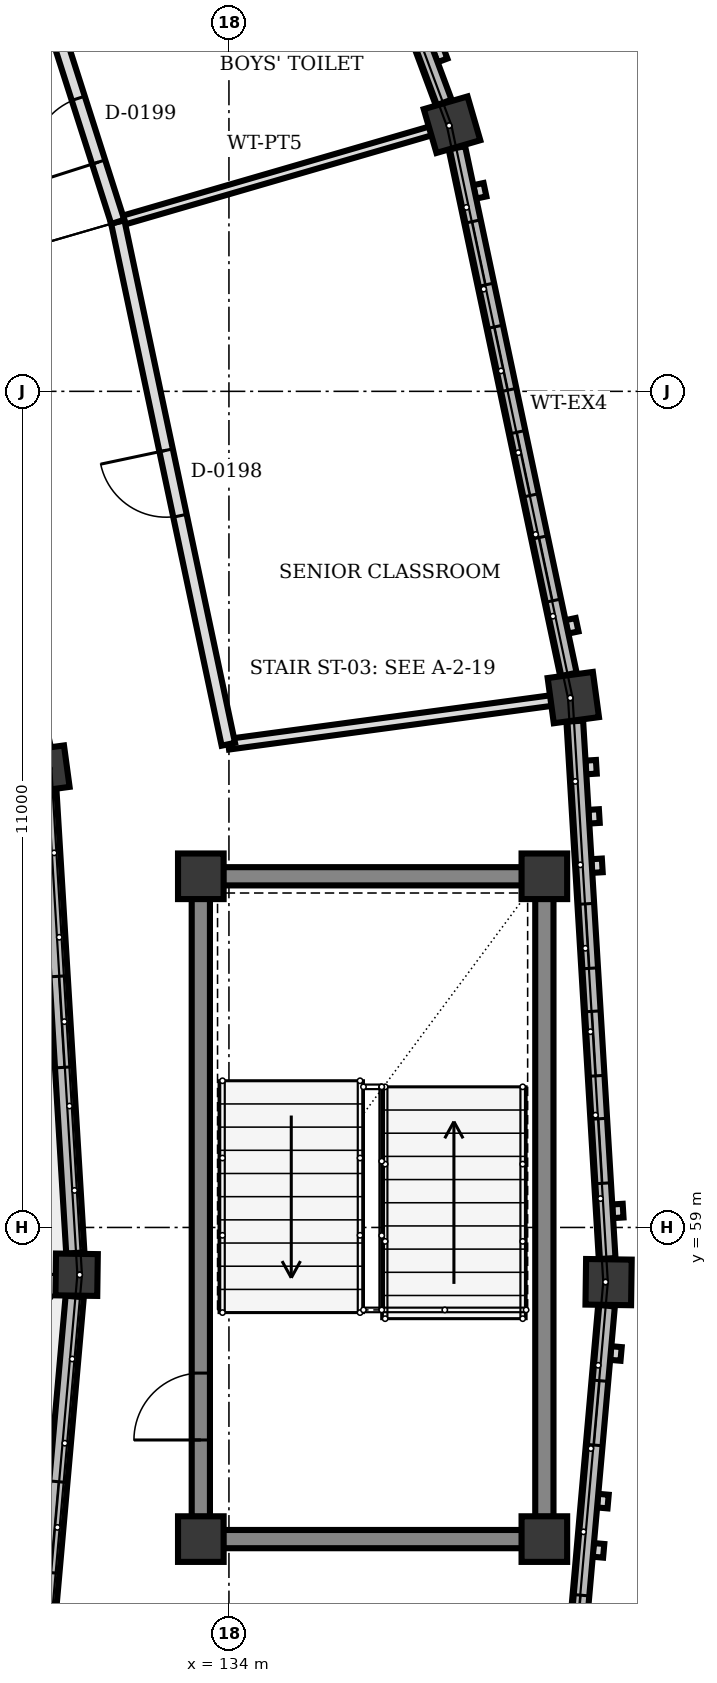
"""IFC4 building model, lengths in metres.
Left out: names, types, materials, properties, quantities, classifications, styles, units other than length and angle.
Written with IfcOpenShell. Run it as: python <this file> out.ifc"""

import sys

from ifc_helpers import new_model, si_unit, direction, frame, frame_2d, origin, origin_2d, place, context, subcontext, project, spatial, rectangle, extrude, element, fill, save


model = new_model("IFC4")
c1 = context("Model", 3, precision=1e-05, world=origin(), true_north=direction((0.0, 1.0)))
c2 = subcontext(c1, "Body", "Model", "MODEL_VIEW")
j1 = project(units=[si_unit("LENGTHUNIT", "METRE"), si_unit("PLANEANGLEUNIT", "RADIAN")], contexts=[c1])
p1 = place(None, origin())
s1 = spatial("IfcSite", under=j1, at=p1, CompositionType="ELEMENT")
p2 = place(p1, origin())
s2 = spatial("IfcBuilding", under=s1, at=p2, CompositionType="ELEMENT")
p3 = place(p2, frame((0.0, 0.0, 8.5)))
s3 = spatial("IfcBuildingStorey", under=s2, at=p3, CompositionType="ELEMENT", Elevation=8.5)
for number, where, z_axis, x_axis in (
    (1, (133.63, 54.9, 0.0), (0.0, 0.0, 1.0), (1.0, 0.0, 0.0)),
    (2, (138.15, 54.9, 0.0), (0.0, 0.0, 1.0), (1.0, 0.0, 0.0)),
    (3, (138.15, 63.62, 0.0), (0.0, 0.0, 1.0), (1.0, 0.0, 0.0)),
    (4, (133.63, 63.62, 0.0), (0.0, 0.0, 1.0), (1.0, 0.0, 0.0)),
):
    element("IfcColumn", number, at=place(p3, frame(where, z_axis=z_axis, x_axis=x_axis)), inside=s3, PredefinedType="COLUMN", context=c2, shape_type="SweptSolid", body=[
        extrude(rectangle(XDim=0.6, YDim=0.6, at=origin_2d()), origin(), (0.0, 0.0, 1.0), 4.0),
    ])
for number, where, z_axis, x_axis in (
    (5, (131.996, 58.378, 0.0), (0.0, 0.0, 1.0), (1.0, -0.014, 0.0)),
    (6, (131.594, 65.032, 0.0), (0.0, 0.0, 1.0), (0.991, 0.134, 0.0)),
):
    element("IfcColumn", number, at=place(p3, frame(where, z_axis=z_axis, x_axis=x_axis)), inside=s3, PredefinedType="COLUMN", context=c2, shape_type="SweptSolid", body=[
        extrude(rectangle(XDim=0.55, YDim=0.55, at=origin_2d()), origin(), (0.0, 0.0, 1.0), 4.0),
    ])
for number, where, z_axis, x_axis in (
    (7, (138.995, 58.281, 0.0), (0.0, 0.0, 1.0), (1.0, -0.014, 0.0)),
    (8, (138.531, 65.971, 0.0), (0.0, 0.0, 1.0), (0.991, 0.134, 0.0)),
    (9, (136.935, 73.508, 0.0), (0.0, 0.0, 1.0), (0.96, 0.279, 0.0)),
):
    element("IfcColumn", number, at=place(p3, frame(where, z_axis=z_axis, x_axis=x_axis)), inside=s3, PredefinedType="COLUMN", context=c2, shape_type="SweptSolid", body=[
        extrude(rectangle(XDim=0.6, YDim=0.6, at=origin_2d()), origin(), (0.0, 0.0, 1.0), 4.0),
    ])
p4 = place(p3, frame((138.968, 57.971, 0.0), z_axis=(0.0, 0.0, 1.0), x_axis=(-0.08798335938, -0.996121944579, 0.0)))
e10 = element("IfcWall", 10, at=p4, inside=s3, PredefinedType="SOLIDWALL", context=c2, shape_type="SweptSolid", body=[
    extrude(rectangle(XDim=7.081, YDim=0.22, at=frame_2d((3.541, 0.0))), origin(), (0.0, 0.0, 1.0), 3.192),
])
p5 = place(p4, frame((0.991, 0.0, 0.85)))
e11 = element("IfcOpeningElement", 11, at=p5, cuts=e10, PredefinedType="OPENING", context=c2, shape_type="SweptSolid", body=[
    extrude(rectangle(XDim=0.85, YDim=1.25, at=frame_2d((0.425, 0.625))), frame((0.0, 0.12, 0.0), z_axis=(0.0, -1.0, 0.0), x_axis=(1.0, 0.0, 0.0)), (0.0, 0.0, 1.0), 0.24),
])
p6 = place(p4, frame((3.824, 0.0, 0.85)))
e12 = element("IfcOpeningElement", 12, at=p6, cuts=e10, PredefinedType="OPENING", context=c2, shape_type="SweptSolid", body=[
    extrude(rectangle(XDim=0.85, YDim=1.25, at=frame_2d((0.425, 0.625))), frame((0.0, 0.12, 0.0), z_axis=(0.0, -1.0, 0.0), x_axis=(1.0, 0.0, 0.0)), (0.0, 0.0, 1.0), 0.24),
])
p7 = place(p4, frame((5.24, 0.0, 0.85)))
e13 = element("IfcOpeningElement", 13, at=p7, cuts=e10, PredefinedType="OPENING", context=c2, shape_type="SweptSolid", body=[
    extrude(rectangle(XDim=0.85, YDim=1.25, at=frame_2d((0.425, 0.625))), frame((0.0, 0.12, 0.0), z_axis=(0.0, -1.0, 0.0), x_axis=(1.0, 0.0, 0.0)), (0.0, 0.0, 1.0), 0.24),
])
p8 = place(p3, frame((131.435, 52.023, 0.0), z_axis=(0.0, 0.0, 1.0), x_axis=(0.087955791154, 0.996124379183, 0.0)))
e14 = element("IfcWall", 14, at=p8, inside=s3, PredefinedType="SOLIDWALL", context=c2, shape_type="SweptSolid", body=[
    extrude(rectangle(XDim=6.093, YDim=0.24, at=frame_2d((3.046, 0.0))), origin(), (0.0, 0.0, 1.0), 3.05),
])
p9 = place(p8, frame((2.446, 0.0, 2.05)))
e15 = element("IfcOpeningElement", 15, at=p9, cuts=e14, PredefinedType="OPENING", context=c2, shape_type="SweptSolid", body=[
    extrude(rectangle(XDim=1.2, YDim=0.85, at=frame_2d((0.6, 0.425))), frame((0.0, 0.13, 0.0), z_axis=(0.0, -1.0, 0.0), x_axis=(1.0, 0.0, 0.0)), (0.0, 0.0, 1.0), 0.26),
])
p10 = place(p3, frame((138.55, 65.661, 0.0), z_axis=(0.0, 0.0, 1.0), x_axis=(0.060150575124, -0.998189314866, 0.0)))
e16 = element("IfcWall", 16, at=p10, inside=s3, PredefinedType="SOLIDWALL", context=c2, shape_type="SweptSolid", body=[
    extrude(rectangle(XDim=7.083, YDim=0.22, at=frame_2d((3.542, 0.0))), origin(), (0.0, 0.0, 1.0), 3.192),
])
p11 = place(p10, frame((2.408, 0.0, 0.85)))
e17 = element("IfcOpeningElement", 17, at=p11, cuts=e16, PredefinedType="OPENING", context=c2, shape_type="SweptSolid", body=[
    extrude(rectangle(XDim=0.85, YDim=1.25, at=frame_2d((0.425, 0.625))), frame((0.0, 0.12, 0.0), z_axis=(0.0, -1.0, 0.0), x_axis=(1.0, 0.0, 0.0)), (0.0, 0.0, 1.0), 0.24),
])
p12 = place(p10, frame((3.825, 0.0, 0.85)))
e18 = element("IfcOpeningElement", 18, at=p12, cuts=e16, PredefinedType="OPENING", context=c2, shape_type="SweptSolid", body=[
    extrude(rectangle(XDim=0.85, YDim=1.25, at=frame_2d((0.425, 0.625))), frame((0.0, 0.12, 0.0), z_axis=(0.0, -1.0, 0.0), x_axis=(1.0, 0.0, 0.0)), (0.0, 0.0, 1.0), 0.24),
])
p13 = place(p10, frame((5.241, 0.0, 0.85)))
e19 = element("IfcOpeningElement", 19, at=p13, cuts=e16, PredefinedType="OPENING", context=c2, shape_type="SweptSolid", body=[
    extrude(rectangle(XDim=0.85, YDim=1.25, at=frame_2d((0.425, 0.625))), frame((0.0, 0.12, 0.0), z_axis=(0.0, -1.0, 0.0), x_axis=(1.0, 0.0, 0.0)), (0.0, 0.0, 1.0), 0.24),
])
p14 = place(p3, frame((131.979, 58.664, 0.0), z_axis=(0.0, 0.0, 1.0), x_axis=(-0.060382554207, 0.998175308825, 0.0)))
e20 = element("IfcWall", 20, at=p14, inside=s3, PredefinedType="SOLIDWALL", context=c2, shape_type="SweptSolid", body=[
    extrude(rectangle(XDim=6.093, YDim=0.24, at=frame_2d((3.047, 0.0))), origin(), (0.0, 0.0, 1.0), 3.05),
])
p15 = place(p14, frame((2.447, 0.0, 2.05)))
e21 = element("IfcOpeningElement", 21, at=p15, cuts=e20, PredefinedType="OPENING", context=c2, shape_type="SweptSolid", body=[
    extrude(rectangle(XDim=1.2, YDim=0.85, at=frame_2d((0.6, 0.425))), frame((0.0, 0.13, 0.0), z_axis=(0.0, -1.0, 0.0), x_axis=(1.0, 0.0, 0.0)), (0.0, 0.0, 1.0), 0.26),
])
p16 = place(p3, frame((136.999, 73.204, 0.0), z_axis=(0.0, 0.0, 1.0), x_axis=(0.207259317734, -0.978286039567, 0.0)))
e22 = element("IfcWall", 22, at=p16, inside=s3, PredefinedType="SOLIDWALL", context=c2, shape_type="SweptSolid", body=[
    extrude(rectangle(XDim=7.083, YDim=0.22, at=frame_2d((3.542, 0.0))), origin(), (0.0, 0.0, 1.0), 3.192),
])
p17 = place(p16, frame((0.992, 0.0, 0.85)))
e23 = element("IfcOpeningElement", 23, at=p17, cuts=e22, PredefinedType="OPENING", context=c2, shape_type="SweptSolid", body=[
    extrude(rectangle(XDim=0.85, YDim=1.25, at=frame_2d((0.425, 0.625))), frame((0.0, 0.12, 0.0), z_axis=(0.0, -1.0, 0.0), x_axis=(1.0, 0.0, 0.0)), (0.0, 0.0, 1.0), 0.24),
])
p18 = place(p16, frame((2.408, 0.0, 0.85)))
e24 = element("IfcOpeningElement", 24, at=p18, cuts=e22, PredefinedType="OPENING", context=c2, shape_type="SweptSolid", body=[
    extrude(rectangle(XDim=0.85, YDim=1.25, at=frame_2d((0.425, 0.625))), frame((0.0, 0.12, 0.0), z_axis=(0.0, -1.0, 0.0), x_axis=(1.0, 0.0, 0.0)), (0.0, 0.0, 1.0), 0.24),
])
p19 = place(p16, frame((3.825, 0.0, 0.85)))
e25 = element("IfcOpeningElement", 25, at=p19, cuts=e22, PredefinedType="OPENING", context=c2, shape_type="SweptSolid", body=[
    extrude(rectangle(XDim=0.85, YDim=1.25, at=frame_2d((0.425, 0.625))), frame((0.0, 0.12, 0.0), z_axis=(0.0, -1.0, 0.0), x_axis=(1.0, 0.0, 0.0)), (0.0, 0.0, 1.0), 0.24),
])
p20 = place(p16, frame((5.241, 0.0, 0.85)))
e26 = element("IfcOpeningElement", 26, at=p20, cuts=e22, PredefinedType="OPENING", context=c2, shape_type="SweptSolid", body=[
    extrude(rectangle(XDim=0.85, YDim=1.25, at=frame_2d((0.425, 0.625))), frame((0.0, 0.12, 0.0), z_axis=(0.0, -1.0, 0.0), x_axis=(1.0, 0.0, 0.0)), (0.0, 0.0, 1.0), 0.24),
])
p21 = place(p3, frame((134.353, 80.435, 0.0), z_axis=(0.0, 0.0, 1.0), x_axis=(0.349192123714, -0.937051151611, 0.0)))
e27 = element("IfcWall", 27, at=p21, inside=s3, PredefinedType="SOLIDWALL", context=c2, shape_type="SweptSolid", body=[
    extrude(rectangle(XDim=7.082, YDim=0.22, at=frame_2d((3.541, 0.0))), origin(), (0.0, 0.0, 1.0), 3.192),
])
p22 = place(p21, frame((0.591, 0.0, 1.15)))
e28 = element("IfcOpeningElement", 28, at=p22, cuts=e27, PredefinedType="OPENING", context=c2, shape_type="SweptSolid", body=[
    extrude(rectangle(XDim=0.8, YDim=1.1, at=frame_2d((0.4, 0.55))), frame((0.0, 0.12, 0.0), z_axis=(0.0, -1.0, 0.0), x_axis=(1.0, 0.0, 0.0)), (0.0, 0.0, 1.0), 0.24),
])
p23 = place(p21, frame((2.858, 0.0, 1.15)))
e29 = element("IfcOpeningElement", 29, at=p23, cuts=e27, PredefinedType="OPENING", context=c2, shape_type="SweptSolid", body=[
    extrude(rectangle(XDim=0.8, YDim=1.1, at=frame_2d((0.4, 0.55))), frame((0.0, 0.12, 0.0), z_axis=(0.0, -1.0, 0.0), x_axis=(1.0, 0.0, 0.0)), (0.0, 0.0, 1.0), 0.24),
])
p24 = place(p21, frame((5.407, 0.0, 1.15)))
e30 = element("IfcOpeningElement", 30, at=p24, cuts=e27, PredefinedType="OPENING", context=c2, shape_type="SweptSolid", body=[
    extrude(rectangle(XDim=0.8, YDim=1.1, at=frame_2d((0.4, 0.55))), frame((0.0, 0.12, 0.0), z_axis=(0.0, -1.0, 0.0), x_axis=(1.0, 0.0, 0.0)), (0.0, 0.0, 1.0), 0.24),
])
p25 = place(p3, frame((133.63, 55.192, 0.0), z_axis=(0.0, 0.0, 1.0), x_axis=(0.0, 1.0, 0.0)))
e31 = element("IfcWall", 31, at=p25, inside=s3, PredefinedType="SHEAR", context=c2, shape_type="SweptSolid", body=[
    extrude(rectangle(XDim=8.136, YDim=0.24, at=frame_2d((4.068, 0.0))), origin(), (0.0, 0.0, 1.0), 3.74),
])
p26 = place(p25, frame((1.012, 0.0, 0.0)))
e32 = element("IfcOpeningElement", 32, at=p26, cuts=e31, PredefinedType="OPENING", context=c2, shape_type="SweptSolid", body=[
    extrude(rectangle(XDim=0.88, YDim=2.1, at=frame_2d((0.44, 1.05))), frame((0.0, 0.13, 0.0), z_axis=(0.0, -1.0, 0.0), x_axis=(1.0, 0.0, 0.0)), (0.0, 0.0, 1.0), 0.26),
])
p27 = place(p3, frame((138.15, 63.328, 0.0), z_axis=(0.0, 0.0, 1.0), x_axis=(0.0, -1.0, 0.0)))
e33 = element("IfcWall", 33, at=p27, inside=s3, PredefinedType="SHEAR", context=c2, shape_type="SweptSolid", body=[
    extrude(rectangle(XDim=8.136, YDim=0.24, at=frame_2d((4.068, 0.0))), origin(), (0.0, 0.0, 1.0), 3.74),
])
for number, where, z_axis, x_axis in (
    (34, (137.858, 54.9, 0.0), (0.0, 0.0, 1.0), (-1.0, 0.0, 0.0)),
    (35, (137.858, 63.62, 0.0), (0.0, 0.0, 1.0), (-1.0, 0.0, 0.0)),
):
    element("IfcWall", number, at=place(p3, frame(where, z_axis=z_axis, x_axis=x_axis)), inside=s3, PredefinedType="SHEAR", context=c2, shape_type="SweptSolid", body=[
        extrude(rectangle(XDim=3.936, YDim=0.24, at=frame_2d((1.968, 0.0))), origin(), (0.0, 0.0, 1.0), 3.74),
    ])
p28 = place(p3, frame((133.992, 65.357, 0.0), z_axis=(0.0, 0.0, 1.0), x_axis=(0.990973022603, 0.134061435445, 0.0)))
e36 = element("IfcWall", 36, at=p28, inside=s3, PredefinedType="PARTITIONING", context=c2, shape_type="SweptSolid", body=[
    extrude(rectangle(XDim=4.289, YDim=0.14, at=frame_2d((2.145, 0.0))), origin(), (0.0, 0.0, 1.0), 3.092),
])
p29 = place(p3, frame((132.537, 72.23, 0.0), z_axis=(0.0, 0.0, 1.0), x_axis=(0.96025274504, 0.279131986063, 0.0)))
e37 = element("IfcWall", 37, at=p29, inside=s3, PredefinedType="PARTITIONING", context=c2, shape_type="SweptSolid", body=[
    extrude(rectangle(XDim=4.288, YDim=0.12, at=frame_2d((2.144, 0.0))), origin(), (0.0, 0.0, 1.0), 3.092),
])
p30 = place(p3, frame((133.992, 65.357, 0.0), z_axis=(0.0, 0.0, 1.0), x_axis=(-0.207083965241, 0.978323173261, 0.0)))
e38 = element("IfcWall", 38, at=p30, inside=s3, PredefinedType="PARTITIONING", context=c2, shape_type="SweptSolid", body=[
    extrude(rectangle(XDim=7.025, YDim=0.18, at=frame_2d((3.513, 0.0))), origin(), (0.0, 0.0, 1.0), 3.092),
])
p31 = place(p30, frame((3.073, 0.0, 0.0)))
e39 = element("IfcOpeningElement", 39, at=p31, cuts=e38, PredefinedType="OPENING", context=c2, shape_type="SweptSolid", body=[
    extrude(rectangle(XDim=0.88, YDim=2.1, at=frame_2d((0.44, 1.05))), frame((0.0, 0.1, 0.0), z_axis=(0.0, -1.0, 0.0), x_axis=(1.0, 0.0, 0.0)), (0.0, 0.0, 1.0), 0.2),
])
p32 = place(p3, frame((132.537, 72.23, 0.0), z_axis=(0.0, 0.0, 1.0), x_axis=(-0.304572752122, 0.952489075352, 0.0)))
e40 = element("IfcWall", 40, at=p32, inside=s3, PredefinedType="PARTITIONING", context=c2, shape_type="SweptSolid", body=[
    extrude(rectangle(XDim=2.531, YDim=0.18, at=frame_2d((1.266, 0.0))), origin(), (0.0, 0.0, 1.0), 3.092),
])
p33 = place(p32, frame((0.826, 0.0, 0.0)))
e41 = element("IfcOpeningElement", 41, at=p33, cuts=e40, PredefinedType="OPENING", context=c2, shape_type="SweptSolid", body=[
    extrude(rectangle(XDim=0.88, YDim=2.1, at=frame_2d((0.44, 1.05))), frame((0.0, 0.1, 0.0), z_axis=(0.0, -1.0, 0.0), x_axis=(1.0, 0.0, 0.0)), (0.0, 0.0, 1.0), 0.2),
])
p34 = place(p5, origin())
e42 = element("IfcWindow", 42, at=p34, inside=s3, PartitioningType="SINGLE_PANEL", PredefinedType="WINDOW", context=c2, shape_type="SweptSolid", body=[
    extrude(rectangle(XDim=0.85, YDim=1.25, at=frame_2d((0.425, 0.625))), frame((0.0, 0.03, 0.0), z_axis=(0.0, -1.0, 0.0), x_axis=(1.0, 0.0, 0.0)), (0.0, 0.0, 1.0), 0.06),
])
fill(e11, e42)
p35 = place(p6, origin())
e43 = element("IfcWindow", 43, at=p35, inside=s3, PartitioningType="SINGLE_PANEL", PredefinedType="WINDOW", context=c2, shape_type="SweptSolid", body=[
    extrude(rectangle(XDim=0.85, YDim=1.25, at=frame_2d((0.425, 0.625))), frame((0.0, 0.03, 0.0), z_axis=(0.0, -1.0, 0.0), x_axis=(1.0, 0.0, 0.0)), (0.0, 0.0, 1.0), 0.06),
])
fill(e12, e43)
p36 = place(p9, origin())
e44 = element("IfcWindow", 44, at=p36, inside=s3, PartitioningType="SINGLE_PANEL", PredefinedType="WINDOW", context=c2, shape_type="SweptSolid", body=[
    extrude(rectangle(XDim=1.2, YDim=0.85, at=frame_2d((0.6, 0.425))), frame((0.0, 0.03, 0.0), z_axis=(0.0, -1.0, 0.0), x_axis=(1.0, 0.0, 0.0)), (0.0, 0.0, 1.0), 0.06),
])
fill(e15, e44)
p37 = place(p11, origin())
e45 = element("IfcWindow", 45, at=p37, inside=s3, PartitioningType="SINGLE_PANEL", PredefinedType="WINDOW", context=c2, shape_type="SweptSolid", body=[
    extrude(rectangle(XDim=0.85, YDim=1.25, at=frame_2d((0.425, 0.625))), frame((0.0, 0.03, 0.0), z_axis=(0.0, -1.0, 0.0), x_axis=(1.0, 0.0, 0.0)), (0.0, 0.0, 1.0), 0.06),
])
fill(e17, e45)
p38 = place(p12, origin())
e46 = element("IfcWindow", 46, at=p38, inside=s3, PartitioningType="SINGLE_PANEL", PredefinedType="WINDOW", context=c2, shape_type="SweptSolid", body=[
    extrude(rectangle(XDim=0.85, YDim=1.25, at=frame_2d((0.425, 0.625))), frame((0.0, 0.03, 0.0), z_axis=(0.0, -1.0, 0.0), x_axis=(1.0, 0.0, 0.0)), (0.0, 0.0, 1.0), 0.06),
])
fill(e18, e46)
p39 = place(p13, origin())
e47 = element("IfcWindow", 47, at=p39, inside=s3, PartitioningType="SINGLE_PANEL", PredefinedType="WINDOW", context=c2, shape_type="SweptSolid", body=[
    extrude(rectangle(XDim=0.85, YDim=1.25, at=frame_2d((0.425, 0.625))), frame((0.0, 0.03, 0.0), z_axis=(0.0, -1.0, 0.0), x_axis=(1.0, 0.0, 0.0)), (0.0, 0.0, 1.0), 0.06),
])
fill(e19, e47)
p40 = place(p15, origin())
e48 = element("IfcWindow", 48, at=p40, inside=s3, PartitioningType="SINGLE_PANEL", PredefinedType="WINDOW", context=c2, shape_type="SweptSolid", body=[
    extrude(rectangle(XDim=1.2, YDim=0.85, at=frame_2d((0.6, 0.425))), frame((0.0, 0.03, 0.0), z_axis=(0.0, -1.0, 0.0), x_axis=(1.0, 0.0, 0.0)), (0.0, 0.0, 1.0), 0.06),
])
fill(e21, e48)
p41 = place(p17, origin())
e49 = element("IfcWindow", 49, at=p41, inside=s3, PartitioningType="SINGLE_PANEL", PredefinedType="WINDOW", context=c2, shape_type="SweptSolid", body=[
    extrude(rectangle(XDim=0.85, YDim=1.25, at=frame_2d((0.425, 0.625))), frame((0.0, 0.03, 0.0), z_axis=(0.0, -1.0, 0.0), x_axis=(1.0, 0.0, 0.0)), (0.0, 0.0, 1.0), 0.06),
])
fill(e23, e49)
p42 = place(p18, origin())
e50 = element("IfcWindow", 50, at=p42, inside=s3, PartitioningType="SINGLE_PANEL", PredefinedType="WINDOW", context=c2, shape_type="SweptSolid", body=[
    extrude(rectangle(XDim=0.85, YDim=1.25, at=frame_2d((0.425, 0.625))), frame((0.0, 0.03, 0.0), z_axis=(0.0, -1.0, 0.0), x_axis=(1.0, 0.0, 0.0)), (0.0, 0.0, 1.0), 0.06),
])
fill(e24, e50)
p43 = place(p19, origin())
e51 = element("IfcWindow", 51, at=p43, inside=s3, PartitioningType="SINGLE_PANEL", PredefinedType="WINDOW", context=c2, shape_type="SweptSolid", body=[
    extrude(rectangle(XDim=0.85, YDim=1.25, at=frame_2d((0.425, 0.625))), frame((0.0, 0.03, 0.0), z_axis=(0.0, -1.0, 0.0), x_axis=(1.0, 0.0, 0.0)), (0.0, 0.0, 1.0), 0.06),
])
fill(e25, e51)
p44 = place(p20, origin())
e52 = element("IfcWindow", 52, at=p44, inside=s3, PartitioningType="SINGLE_PANEL", PredefinedType="WINDOW", context=c2, shape_type="SweptSolid", body=[
    extrude(rectangle(XDim=0.85, YDim=1.25, at=frame_2d((0.425, 0.625))), frame((0.0, 0.03, 0.0), z_axis=(0.0, -1.0, 0.0), x_axis=(1.0, 0.0, 0.0)), (0.0, 0.0, 1.0), 0.06),
])
fill(e26, e52)
p45 = place(p26, origin())
e53 = element("IfcDoor", 53, at=p45, inside=s3, OperationType="SINGLE_SWING_LEFT", PredefinedType="DOOR", context=c2, shape_type="SweptSolid", body=[
    extrude(rectangle(XDim=0.88, YDim=2.1, at=frame_2d((0.44, 1.05))), frame((0.0, 0.025, 0.0), z_axis=(0.0, -1.0, 0.0), x_axis=(1.0, 0.0, 0.0)), (0.0, 0.0, 1.0), 0.05),
])
fill(e32, e53)
p46 = place(p31, origin())
e54 = element("IfcDoor", 54, at=p46, inside=s3, OperationType="SINGLE_SWING_RIGHT", PredefinedType="DOOR", context=c2, shape_type="SweptSolid", body=[
    extrude(rectangle(XDim=0.88, YDim=2.1, at=frame_2d((0.44, 1.05))), frame((0.0, 0.025, 0.0), z_axis=(0.0, -1.0, 0.0), x_axis=(1.0, 0.0, 0.0)), (0.0, 0.0, 1.0), 0.05),
])
fill(e39, e54)
p47 = place(p33, origin())
e55 = element("IfcDoor", 55, at=p47, inside=s3, OperationType="SINGLE_SWING_LEFT", PredefinedType="DOOR", context=c2, shape_type="SweptSolid", body=[
    extrude(rectangle(XDim=0.88, YDim=2.1, at=frame_2d((0.44, 1.05))), frame((0.0, 0.025, 0.0), z_axis=(0.0, -1.0, 0.0), x_axis=(1.0, 0.0, 0.0)), (0.0, 0.0, 1.0), 0.05),
])
fill(e41, e55)
save(model, sys.argv[1])
